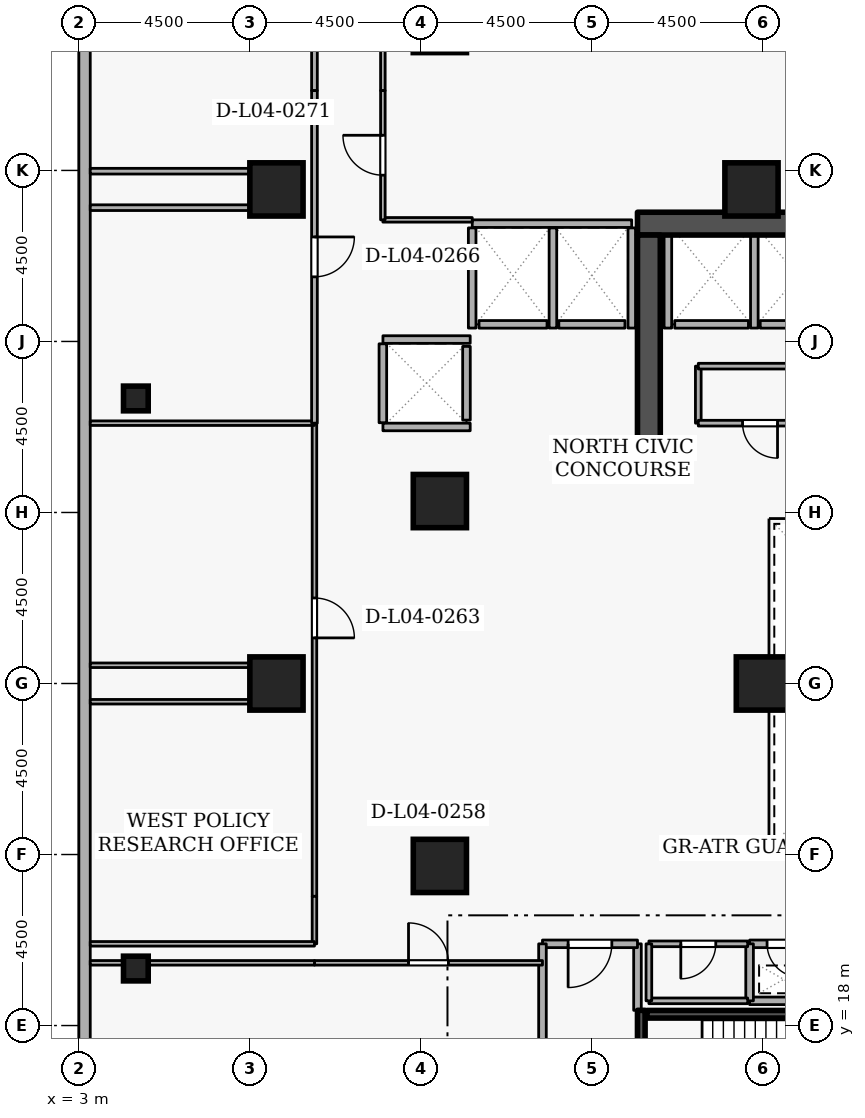
"""IFC4 building model, lengths in metres.
Left out: names, types, materials, properties, quantities, classifications, styles, units other than length and angle.
Written with IfcOpenShell. Run it as: python <this file> out.ifc"""

import sys

from ifc_helpers import new_model, si_unit, direction, frame, frame_2d, origin, origin_2d, place, context, subcontext, project, spatial, rectangle, extrude, element, fill, save


model = new_model("IFC4")
c1 = context("Model", 3, precision=1e-05, world=origin(), true_north=direction((0.0, 1.0)))
c2 = subcontext(c1, "Body", "Model", "MODEL_VIEW")
j1 = project(units=[si_unit("LENGTHUNIT", "METRE"), si_unit("PLANEANGLEUNIT", "RADIAN")], contexts=[c1])
p1 = place(None, origin())
s1 = spatial("IfcSite", under=j1, at=p1, CompositionType="ELEMENT")
p2 = place(p1, origin())
s2 = spatial("IfcBuilding", under=s1, at=p2, CompositionType="ELEMENT")
p3 = place(p2, frame((0.0, 0.0, 18.6)))
s3 = spatial("IfcBuildingStorey", under=s2, at=p3, CompositionType="ELEMENT", Elevation=18.6)
p4 = place(p3, frame((17.7, 39.1, 0.0), z_axis=(0.0, 0.0, 1.0), x_axis=(1.0, 0.0, 0.0)))
e1 = element("IfcWall", 1, at=p4, inside=s3, PredefinedType="SHEAR", context=c2, shape_type="SweptSolid", body=[
    extrude(rectangle(XDim=15.6, YDim=0.6, at=frame_2d((7.8, 0.0))), origin(), (0.0, 0.0, 1.0), 4.5),
])
p5 = place(p3, frame((18.0, 33.1, 0.0), z_axis=(0.0, 0.0, 1.0), x_axis=(0.0, 1.0, 0.0)))
e2 = element("IfcWall", 2, at=p5, inside=s3, PredefinedType="SHEAR", context=c2, shape_type="SweptSolid", body=[
    extrude(rectangle(XDim=5.7, YDim=0.6, at=frame_2d((2.85, 0.0))), origin(), (0.0, 0.0, 1.0), 4.5),
])
for number, where, z_axis, x_axis in (
    (3, (8.2, 27.0, 0.0), (0.0, 0.0, 1.0), (1.0, 0.0, 0.0)),
    (4, (8.2, 40.0, 0.0), (0.0, 0.0, 1.0), (1.0, 0.0, 0.0)),
    (5, (12.5, 22.2, 0.0), (0.0, 0.0, 1.0), (1.0, 0.0, 0.0)),
    (6, (12.5, 31.8, 0.0), (0.0, 0.0, 1.0), (1.0, 0.0, 0.0)),
    (7, (20.7, 40.0, 0.0), (0.0, 0.0, 1.0), (1.0, 0.0, 0.0)),
    (8, (21.0, 27.0, 0.0), (0.0, 0.0, 1.0), (1.0, 0.0, 0.0)),
):
    element("IfcColumn", number, at=place(p3, frame(where, z_axis=z_axis, x_axis=x_axis)), inside=s3, PredefinedType="COLUMN", context=c2, shape_type="SweptSolid", body=[
        extrude(rectangle(XDim=1.4, YDim=1.4, at=origin_2d()), origin(), (0.0, 0.0, 1.0), 4.5),
    ])
for number, where, z_axis, x_axis in (
    (9, (4.5, 19.5, 0.0), (0.0, 0.0, 1.0), (1.0, 0.0, 0.0)),
    (10, (4.5, 34.5, 0.0), (0.0, 0.0, 1.0), (1.0, 0.0, 0.0)),
):
    element("IfcColumn", number, at=place(p3, frame(where, z_axis=z_axis, x_axis=x_axis)), inside=s3, PredefinedType="COLUMN", context=c2, shape_type="SweptSolid", body=[
        extrude(rectangle(XDim=0.65, YDim=0.65, at=origin_2d()), origin(), (0.0, 0.0, 1.0), 4.5),
    ])
p6 = place(p3, frame((3.15, 49.18, 0.0), z_axis=(0.0, 0.0, 1.0), x_axis=(0.0, -1.0, 0.0)))
e11 = element("IfcWall", 11, at=p6, inside=s3, PredefinedType="STANDARD", context=c2, shape_type="SweptSolid", body=[
    extrude(rectangle(XDim=38.36, YDim=0.3, at=frame_2d((19.18, 0.0))), origin(), (0.0, 0.0, 1.0), 3.56),
])
p7 = place(p3, frame((22.92, 36.45, 0.0), z_axis=(0.0, 0.0, 1.0), x_axis=(-1.0, 0.0, 0.0)))
e12 = element("IfcWall", 12, at=p7, inside=s3, PredefinedType="STANDARD", context=c2, shape_type="SweptSolid", body=[
    extrude(rectangle(XDim=1.99, YDim=0.2, at=frame_2d((0.995, 0.0))), origin(), (0.0, 0.0, 1.0), 4.16),
])
p8 = place(p3, frame((20.62, 36.45, 0.0), z_axis=(0.0, 0.0, 1.0), x_axis=(-1.0, 0.0, 0.0)))
e13 = element("IfcWall", 13, at=p8, inside=s3, PredefinedType="STANDARD", context=c2, shape_type="SweptSolid", body=[
    extrude(rectangle(XDim=1.94, YDim=0.2, at=frame_2d((0.97, 0.0))), origin(), (0.0, 0.0, 1.0), 4.16),
])
p9 = place(p3, frame((17.37, 36.45, 0.0), z_axis=(0.0, 0.0, 1.0), x_axis=(-1.0, 0.0, 0.0)))
e14 = element("IfcWall", 14, at=p9, inside=s3, PredefinedType="STANDARD", context=c2, shape_type="SweptSolid", body=[
    extrude(rectangle(XDim=1.74, YDim=0.2, at=frame_2d((0.87, 0.0))), origin(), (0.0, 0.0, 1.0), 4.16),
])
p10 = place(p3, frame((15.32, 36.45, 0.0), z_axis=(0.0, 0.0, 1.0), x_axis=(-1.0, 0.0, 0.0)))
e15 = element("IfcWall", 15, at=p10, inside=s3, PredefinedType="STANDARD", context=c2, shape_type="SweptSolid", body=[
    extrude(rectangle(XDim=1.79, YDim=0.2, at=frame_2d((0.895, 0.0))), origin(), (0.0, 0.0, 1.0), 4.16),
])
p11 = place(p3, frame((13.2, 33.93, 0.0), z_axis=(0.0, 0.0, 1.0), x_axis=(0.0, 1.0, 0.0)))
e16 = element("IfcWall", 16, at=p11, inside=s3, PredefinedType="STANDARD", context=c2, shape_type="SweptSolid", body=[
    extrude(rectangle(XDim=1.94, YDim=0.2, at=frame_2d((0.97, 0.0))), origin(), (0.0, 0.0, 1.0), 4.16),
])
for number, where, z_axis, x_axis in (
    (17, (20.775, 36.352, 0.0), (0.0, 0.0, 1.0), (0.0, 1.0, 0.0)),
    (18, (18.5, 36.352, 0.0), (0.0, 0.0, 1.0), (0.0, 1.0, 0.0)),
):
    element("IfcWall", number, at=place(p3, frame(where, z_axis=z_axis, x_axis=x_axis)), inside=s3, PredefinedType="STANDARD", context=c2, shape_type="SweptSolid", body=[
        extrude(rectangle(XDim=2.436, YDim=0.2, at=frame_2d((1.218, 0.0))), origin(), (0.0, 0.0, 1.0), 4.16),
    ])
p12 = place(p3, frame((13.352, 39.1, 0.0), z_axis=(0.0, 0.0, 1.0), x_axis=(1.0, 0.0, 0.0)))
e19 = element("IfcWall", 19, at=p12, inside=s3, PredefinedType="STANDARD", context=c2, shape_type="SweptSolid", body=[
    extrude(rectangle(XDim=4.196, YDim=0.2, at=frame_2d((2.098, 0.0))), origin(), (0.0, 0.0, 1.0), 4.16),
])
p13 = place(p3, frame((17.55, 36.352, 0.0), z_axis=(0.0, 0.0, 1.0), x_axis=(0.0, 1.0, 0.0)))
e20 = element("IfcWall", 20, at=p13, inside=s3, PredefinedType="STANDARD", context=c2, shape_type="SweptSolid", body=[
    extrude(rectangle(XDim=2.636, YDim=0.2, at=frame_2d((1.318, 0.0))), origin(), (0.0, 0.0, 1.0), 3.365),
])
for number, where, z_axis, x_axis in (
    (21, (15.475, 36.352, 0.0), (0.0, 0.0, 1.0), (0.0, 1.0, 0.0)),
    (22, (13.35, 36.352, 0.0), (0.0, 0.0, 1.0), (0.0, 1.0, 0.0)),
):
    element("IfcWall", number, at=place(p3, frame(where, z_axis=z_axis, x_axis=x_axis)), inside=s3, PredefinedType="STANDARD", context=c2, shape_type="SweptSolid", body=[
        extrude(rectangle(XDim=2.636, YDim=0.2, at=frame_2d((1.318, 0.0))), origin(), (0.0, 0.0, 1.0), 4.16),
    ])
for number, where, z_axis, x_axis in (
    (23, (11.002, 36.05, 0.0), (0.0, 0.0, 1.0), (1.0, 0.0, 0.0)),
    (24, (11.002, 33.75, 0.0), (0.0, 0.0, 1.0), (1.0, 0.0, 0.0)),
):
    element("IfcWall", number, at=place(p3, frame(where, z_axis=z_axis, x_axis=x_axis)), inside=s3, PredefinedType="STANDARD", context=c2, shape_type="SweptSolid", body=[
        extrude(rectangle(XDim=2.296, YDim=0.2, at=frame_2d((1.148, 0.0))), origin(), (0.0, 0.0, 1.0), 4.16),
    ])
p14 = place(p3, frame((11.0, 33.862, 0.0), z_axis=(0.0, 0.0, 1.0), x_axis=(0.0, 1.0, 0.0)))
e25 = element("IfcWall", 25, at=p14, inside=s3, PredefinedType="STANDARD", context=c2, shape_type="SweptSolid", body=[
    extrude(rectangle(XDim=2.076, YDim=0.2, at=frame_2d((1.038, 0.0))), origin(), (0.0, 0.0, 1.0), 4.16),
])
p15 = place(p3, frame((17.8, 15.05, 0.0), z_axis=(0.0, 0.0, 1.0), x_axis=(0.0, 1.0, 0.0)))
e26 = element("IfcWall", 26, at=p15, inside=s3, PredefinedType="SHEAR", context=c2, shape_type="SweptSolid", body=[
    extrude(rectangle(XDim=3.35, YDim=0.2, at=frame_2d((1.675, 0.0))), origin(), (0.0, 0.0, 1.0), 4.5),
])
p16 = place(p15, frame((1.125, 0.0, 0.0)))
e27 = element("IfcOpeningElement", 27, at=p16, cuts=e26, PredefinedType="OPENING", context=c2, shape_type="SweptSolid", body=[
    extrude(rectangle(XDim=1.1, YDim=2.1, at=frame_2d((0.55, 1.05))), frame((0.0, 0.11, 0.0), z_axis=(0.0, -1.0, 0.0), x_axis=(1.0, 0.0, 0.0)), (0.0, 0.0, 1.0), 0.22),
])
p17 = place(p3, frame((25.05, 18.297, 0.0), z_axis=(0.0, 0.0, 1.0), x_axis=(-1.0, 0.0, 0.0)))
e28 = element("IfcWall", 28, at=p17, inside=s3, PredefinedType="SHEAR", context=c2, shape_type="SweptSolid", body=[
    extrude(rectangle(XDim=7.1, YDim=0.2, at=frame_2d((3.55, 0.0))), origin(), (0.0, 0.0, 1.0), 4.5),
])
p18 = place(p3, frame((17.7, 18.4, 0.0), z_axis=(0.0, 0.0, 1.0), x_axis=(0.0, 1.0, 0.0)))
e29 = element("IfcWall", 29, at=p18, inside=s3, PredefinedType="STANDARD", context=c2, shape_type="SweptSolid", body=[
    extrude(rectangle(XDim=1.75, YDim=0.2, at=frame_2d((0.875, 0.0))), origin(), (0.0, 0.0, 1.0), 3.365),
])
p19 = place(p3, frame((17.7, 20.15, 0.0), z_axis=(0.0, 0.0, 1.0), x_axis=(-1.0, 0.0, 0.0)))
e30 = element("IfcWall", 30, at=p19, inside=s3, PredefinedType="STANDARD", context=c2, shape_type="SweptSolid", body=[
    extrude(rectangle(XDim=2.5, YDim=0.2, at=frame_2d((1.25, 0.0))), origin(), (0.0, 0.0, 1.0), 4.16),
])
p20 = place(p19, frame((0.675, 0.0, 0.0)))
e31 = element("IfcOpeningElement", 31, at=p20, cuts=e30, PredefinedType="OPENING", context=c2, shape_type="SweptSolid", body=[
    extrude(rectangle(XDim=1.15, YDim=2.1, at=frame_2d((0.575, 1.05))), frame((0.0, 0.11, 0.0), z_axis=(0.0, -1.0, 0.0), x_axis=(1.0, 0.0, 0.0)), (0.0, 0.0, 1.0), 0.22),
])
p21 = place(p3, frame((15.2, 20.15, 0.0), z_axis=(0.0, 0.0, 1.0), x_axis=(0.0, -1.0, 0.0)))
e32 = element("IfcWall", 32, at=p21, inside=s3, PredefinedType="STANDARD", context=c2, shape_type="SweptSolid", body=[
    extrude(rectangle(XDim=5.15, YDim=0.2, at=frame_2d((2.575, 0.0))), origin(), (0.0, 0.0, 1.0), 4.16),
])
p22 = place(p3, frame((20.65, 18.65, 0.0), z_axis=(0.0, 0.0, 1.0), x_axis=(1.0, 0.0, 0.0)))
e33 = element("IfcWall", 33, at=p22, inside=s3, PredefinedType="STANDARD", context=c2, shape_type="SweptSolid", body=[
    extrude(rectangle(XDim=1.8, YDim=0.2, at=frame_2d((0.9, 0.0))), origin(), (0.0, 0.0, 1.0), 4.16),
])
p23 = place(p3, frame((22.45, 20.15, 0.0), z_axis=(0.0, 0.0, 1.0), x_axis=(-1.0, 0.0, 0.0)))
e34 = element("IfcWall", 34, at=p23, inside=s3, PredefinedType="STANDARD", context=c2, shape_type="SweptSolid", body=[
    extrude(rectangle(XDim=1.8, YDim=0.2, at=frame_2d((0.9, 0.0))), origin(), (0.0, 0.0, 1.0), 4.16),
])
p24 = place(p23, frame((0.46, 0.0, 0.0)))
e35 = element("IfcOpeningElement", 35, at=p24, cuts=e34, PredefinedType="OPENING", context=c2, shape_type="SweptSolid", body=[
    extrude(rectangle(XDim=0.88, YDim=2.04, at=frame_2d((0.44, 1.02))), frame((0.0, 0.11, 0.0), z_axis=(0.0, -1.0, 0.0), x_axis=(1.0, 0.0, 0.0)), (0.0, 0.0, 1.0), 0.22),
])
p25 = place(p3, frame((20.65, 20.15, 0.0), z_axis=(0.0, 0.0, 1.0), x_axis=(0.0, -1.0, 0.0)))
e36 = element("IfcWall", 36, at=p25, inside=s3, PredefinedType="STANDARD", context=c2, shape_type="SweptSolid", body=[
    extrude(rectangle(XDim=1.5, YDim=0.2, at=frame_2d((0.75, 0.0))), origin(), (0.0, 0.0, 1.0), 4.16),
])
p26 = place(p3, frame((18.0, 18.65, 0.0), z_axis=(0.0, 0.0, 1.0), x_axis=(1.0, 0.0, 0.0)))
e37 = element("IfcWall", 37, at=p26, inside=s3, PredefinedType="PARTITIONING", context=c2, shape_type="SweptSolid", body=[
    extrude(rectangle(XDim=2.6, YDim=0.15, at=frame_2d((1.3, 0.0))), origin(), (0.0, 0.0, 1.0), 4.16),
])
p27 = place(p3, frame((20.6, 20.15, 0.0), z_axis=(0.0, 0.0, 1.0), x_axis=(-1.0, 0.0, 0.0)))
e38 = element("IfcWall", 38, at=p27, inside=s3, PredefinedType="PARTITIONING", context=c2, shape_type="SweptSolid", body=[
    extrude(rectangle(XDim=2.6, YDim=0.15, at=frame_2d((1.3, 0.0))), origin(), (0.0, 0.0, 1.0), 4.16),
])
p28 = place(p27, frame((0.84, 0.0, 0.0)))
e39 = element("IfcOpeningElement", 39, at=p28, cuts=e38, PredefinedType="OPENING", context=c2, shape_type="SweptSolid", body=[
    extrude(rectangle(XDim=0.92, YDim=2.08, at=frame_2d((0.46, 1.04))), frame((0.0, 0.085, 0.0), z_axis=(0.0, -1.0, 0.0), x_axis=(1.0, 0.0, 0.0)), (0.0, 0.0, 1.0), 0.17),
])
p29 = place(p3, frame((18.0, 20.15, 0.0), z_axis=(0.0, 0.0, 1.0), x_axis=(0.0, -1.0, 0.0)))
e40 = element("IfcWall", 40, at=p29, inside=s3, PredefinedType="PARTITIONING", context=c2, shape_type="SweptSolid", body=[
    extrude(rectangle(XDim=1.5, YDim=0.15, at=frame_2d((0.75, 0.0))), origin(), (0.0, 0.0, 1.0), 3.365),
])
p30 = place(p3, frame((19.3, 33.85, 0.0), z_axis=(0.0, 0.0, 1.0), x_axis=(0.0, 1.0, 0.0)))
e41 = element("IfcWall", 41, at=p30, inside=s3, PredefinedType="PARTITIONING", context=c2, shape_type="SweptSolid", body=[
    extrude(rectangle(XDim=1.5, YDim=0.15, at=frame_2d((0.75, 0.0))), origin(), (0.0, 0.0, 1.0), 4.16),
])
p31 = place(p3, frame((19.3, 35.35, 0.0), z_axis=(0.0, 0.0, 1.0), x_axis=(1.0, 0.0, 0.0)))
e42 = element("IfcWall", 42, at=p31, inside=s3, PredefinedType="PARTITIONING", context=c2, shape_type="SweptSolid", body=[
    extrude(rectangle(XDim=3.25, YDim=0.15, at=frame_2d((1.625, 0.0))), origin(), (0.0, 0.0, 1.0), 4.16),
])
p32 = place(p3, frame((22.55, 33.85, 0.0), z_axis=(0.0, 0.0, 1.0), x_axis=(-1.0, 0.0, 0.0)))
e43 = element("IfcWall", 43, at=p32, inside=s3, PredefinedType="PARTITIONING", context=c2, shape_type="SweptSolid", body=[
    extrude(rectangle(XDim=3.25, YDim=0.15, at=frame_2d((1.625, 0.0))), origin(), (0.0, 0.0, 1.0), 4.16),
])
p33 = place(p32, frame((1.165, 0.0, 0.0)))
e44 = element("IfcOpeningElement", 44, at=p33, cuts=e43, PredefinedType="OPENING", context=c2, shape_type="SweptSolid", body=[
    extrude(rectangle(XDim=0.92, YDim=2.08, at=frame_2d((0.46, 1.04))), frame((0.0, 0.085, 0.0), z_axis=(0.0, -1.0, 0.0), x_axis=(1.0, 0.0, 0.0)), (0.0, 0.0, 1.0), 0.17),
])
p34 = place(p3, frame((9.2, 19.65, 0.0), z_axis=(0.0, 0.0, 1.0), x_axis=(1.0, 0.0, 0.0)))
e45 = element("IfcWall", 45, at=p34, inside=s3, PredefinedType="PARTITIONING", context=c2, shape_type="SweptSolid", body=[
    extrude(rectangle(XDim=6.0, YDim=0.12, at=frame_2d((3.0, 0.0))), origin(), (0.0, 0.0, 1.0), 4.16),
])
p35 = place(p34, frame((2.475, 0.0, 0.0)))
e46 = element("IfcOpeningElement", 46, at=p35, cuts=e45, PredefinedType="OPENING", context=c2, shape_type="SweptSolid", body=[
    extrude(rectangle(XDim=1.05, YDim=2.1, at=frame_2d((0.525, 1.05))), frame((0.0, 0.07, 0.0), z_axis=(0.0, -1.0, 0.0), x_axis=(1.0, 0.0, 0.0)), (0.0, 0.0, 1.0), 0.14),
])
p36 = place(p3, frame((3.3, 19.65, 0.0), z_axis=(0.0, 0.0, 1.0), x_axis=(1.0, 0.0, 0.0)))
e47 = element("IfcWall", 47, at=p36, inside=s3, PredefinedType="PARTITIONING", context=c2, shape_type="SweptSolid", body=[
    extrude(rectangle(XDim=5.9, YDim=0.12, at=frame_2d((2.95, 0.0))), origin(), (0.0, 0.0, 1.0), 4.16),
])
p37 = place(p3, frame((9.2, 33.85, 0.0), z_axis=(0.0, 0.0, 1.0), x_axis=(0.0, -1.0, 0.0)))
e48 = element("IfcWall", 48, at=p37, inside=s3, PredefinedType="PARTITIONING", context=c2, shape_type="SweptSolid", body=[
    extrude(rectangle(XDim=12.45, YDim=0.12, at=frame_2d((6.225, 0.0))), origin(), (0.0, 0.0, 1.0), 4.16),
])
p38 = place(p37, frame((4.6, 0.0, 0.0)))
e49 = element("IfcOpeningElement", 49, at=p38, cuts=e48, PredefinedType="OPENING", context=c2, shape_type="SweptSolid", body=[
    extrude(rectangle(XDim=1.05, YDim=2.1, at=frame_2d((0.525, 1.05))), frame((0.0, 0.07, 0.0), z_axis=(0.0, -1.0, 0.0), x_axis=(1.0, 0.0, 0.0)), (0.0, 0.0, 1.0), 0.14),
])
p39 = place(p3, frame((9.2, 21.4, 0.0), z_axis=(0.0, 0.0, 1.0), x_axis=(0.0, -1.0, 0.0)))
e50 = element("IfcWall", 50, at=p39, inside=s3, PredefinedType="PARTITIONING", context=c2, shape_type="SweptSolid", body=[
    extrude(rectangle(XDim=1.25, YDim=0.12, at=frame_2d((0.625, 0.0))), origin(), (0.0, 0.0, 1.0), 4.16),
])
p40 = place(p3, frame((9.2, 20.15, 0.0), z_axis=(0.0, 0.0, 1.0), x_axis=(-1.0, 0.0, 0.0)))
e51 = element("IfcWall", 51, at=p40, inside=s3, PredefinedType="PARTITIONING", context=c2, shape_type="SweptSolid", body=[
    extrude(rectangle(XDim=5.9, YDim=0.12, at=frame_2d((2.95, 0.0))), origin(), (0.0, 0.0, 1.0), 4.16),
])
for number, where, z_axis, x_axis in (
    (52, (3.3, 26.52, 0.0), (0.0, 0.0, 1.0), (1.0, 0.0, 0.0)),
    (53, (8.2, 27.48, 0.0), (0.0, 0.0, 1.0), (-1.0, 0.0, 0.0)),
):
    element("IfcWall", number, at=place(p3, frame(where, z_axis=z_axis, x_axis=x_axis)), inside=s3, PredefinedType="PARTITIONING", context=c2, shape_type="SweptSolid", body=[
        extrude(rectangle(XDim=4.9, YDim=0.12, at=frame_2d((2.45, 0.0))), origin(), (0.0, 0.0, 1.0), 4.16),
    ])
p41 = place(p3, frame((3.3, 33.85, 0.0), z_axis=(0.0, 0.0, 1.0), x_axis=(1.0, 0.0, 0.0)))
e54 = element("IfcWall", 54, at=p41, inside=s3, PredefinedType="PARTITIONING", context=c2, shape_type="SweptSolid", body=[
    extrude(rectangle(XDim=5.9, YDim=0.12, at=frame_2d((2.95, 0.0))), origin(), (0.0, 0.0, 1.0), 4.16),
])
p42 = place(p3, frame((9.2, 49.18, 0.0), z_axis=(0.0, 0.0, 1.0), x_axis=(0.0, -1.0, 0.0)))
e55 = element("IfcWall", 55, at=p42, inside=s3, PredefinedType="PARTITIONING", context=c2, shape_type="SweptSolid", body=[
    extrude(rectangle(XDim=6.58, YDim=0.15, at=frame_2d((3.29, 0.0))), origin(), (0.0, 0.0, 1.0), 4.16),
])
p43 = place(p3, frame((9.2, 42.6, 0.0), z_axis=(0.0, 0.0, 1.0), x_axis=(0.0, -1.0, 0.0)))
e56 = element("IfcWall", 56, at=p43, inside=s3, PredefinedType="PARTITIONING", context=c2, shape_type="SweptSolid", body=[
    extrude(rectangle(XDim=8.75, YDim=0.15, at=frame_2d((4.375, 0.0))), origin(), (0.0, 0.0, 1.0), 4.16),
])
p44 = place(p43, frame((3.85, 0.0, 0.0)))
e57 = element("IfcOpeningElement", 57, at=p44, cuts=e56, PredefinedType="OPENING", context=c2, shape_type="SweptSolid", body=[
    extrude(rectangle(XDim=1.05, YDim=2.1, at=frame_2d((0.525, 1.05))), frame((0.0, 0.085, 0.0), z_axis=(0.0, -1.0, 0.0), x_axis=(1.0, 0.0, 0.0)), (0.0, 0.0, 1.0), 0.17),
])
for number, where, z_axis, x_axis in (
    (58, (3.3, 39.52, 0.0), (0.0, 0.0, 1.0), (1.0, 0.0, 0.0)),
    (59, (8.2, 40.48, 0.0), (0.0, 0.0, 1.0), (-1.0, 0.0, 0.0)),
):
    element("IfcWall", number, at=place(p3, frame(where, z_axis=z_axis, x_axis=x_axis)), inside=s3, PredefinedType="PARTITIONING", context=c2, shape_type="SweptSolid", body=[
        extrude(rectangle(XDim=4.9, YDim=0.15, at=frame_2d((2.45, 0.0))), origin(), (0.0, 0.0, 1.0), 4.16),
    ])
p45 = place(p3, frame((11.0, 42.6, 0.0), z_axis=(0.0, 0.0, 1.0), x_axis=(0.0, 1.0, 0.0)))
e60 = element("IfcWall", 60, at=p45, inside=s3, PredefinedType="PARTITIONING", context=c2, shape_type="SweptSolid", body=[
    extrude(rectangle(XDim=6.58, YDim=0.12, at=frame_2d((3.29, 0.0))), origin(), (0.0, 0.0, 1.0), 4.16),
])
p46 = place(p3, frame((13.352, 39.2, 0.0), z_axis=(0.0, 0.0, 1.0), x_axis=(-1.0, 0.0, 0.0)))
e61 = element("IfcWall", 61, at=p46, inside=s3, PredefinedType="PARTITIONING", context=c2, shape_type="SweptSolid", body=[
    extrude(rectangle(XDim=2.352, YDim=0.12, at=frame_2d((1.176, 0.0))), origin(), (0.0, 0.0, 1.0), 4.16),
])
p47 = place(p3, frame((11.0, 39.2, 0.0), z_axis=(0.0, 0.0, 1.0), x_axis=(0.0, 1.0, 0.0)))
e62 = element("IfcWall", 62, at=p47, inside=s3, PredefinedType="PARTITIONING", context=c2, shape_type="SweptSolid", body=[
    extrude(rectangle(XDim=3.4, YDim=0.12, at=frame_2d((1.7, 0.0))), origin(), (0.0, 0.0, 1.0), 4.16),
])
p48 = place(p47, frame((1.175, 0.0, 0.0)))
e63 = element("IfcOpeningElement", 63, at=p48, cuts=e62, PredefinedType="OPENING", context=c2, shape_type="SweptSolid", body=[
    extrude(rectangle(XDim=1.05, YDim=2.1, at=frame_2d((0.525, 1.05))), frame((0.0, 0.07, 0.0), z_axis=(0.0, -1.0, 0.0), x_axis=(1.0, 0.0, 0.0)), (0.0, 0.0, 1.0), 0.14),
])
p49 = place(p20, origin())
e64 = element("IfcDoor", 64, at=p49, inside=s3, OperationType="SINGLE_SWING_RIGHT", PredefinedType="DOOR", context=c2, shape_type="SweptSolid", body=[
    extrude(rectangle(XDim=1.15, YDim=2.1, at=frame_2d((0.575, 1.05))), frame((0.0, 0.025, 0.0), z_axis=(0.0, -1.0, 0.0), x_axis=(1.0, 0.0, 0.0)), (0.0, 0.0, 1.0), 0.05),
])
fill(e31, e64)
p50 = place(p24, origin())
e65 = element("IfcDoor", 65, at=p50, inside=s3, OperationType="SINGLE_SWING_LEFT", PredefinedType="DOOR", context=c2, shape_type="SweptSolid", body=[
    extrude(rectangle(XDim=0.88, YDim=2.04, at=frame_2d((0.44, 1.02))), frame((0.0, 0.025, 0.0), z_axis=(0.0, -1.0, 0.0), x_axis=(1.0, 0.0, 0.0)), (0.0, 0.0, 1.0), 0.05),
])
fill(e35, e65)
p51 = place(p28, origin())
e66 = element("IfcDoor", 66, at=p51, inside=s3, OperationType="SINGLE_SWING_RIGHT", PredefinedType="DOOR", context=c2, shape_type="SweptSolid", body=[
    extrude(rectangle(XDim=0.92, YDim=2.08, at=frame_2d((0.46, 1.04))), frame((0.0, 0.025, 0.0), z_axis=(0.0, -1.0, 0.0), x_axis=(1.0, 0.0, 0.0)), (0.0, 0.0, 1.0), 0.05),
])
fill(e39, e66)
p52 = place(p33, origin())
e67 = element("IfcDoor", 67, at=p52, inside=s3, OperationType="SINGLE_SWING_LEFT", PredefinedType="DOOR", context=c2, shape_type="SweptSolid", body=[
    extrude(rectangle(XDim=0.92, YDim=2.08, at=frame_2d((0.46, 1.04))), frame((0.0, 0.025, 0.0), z_axis=(0.0, -1.0, 0.0), x_axis=(1.0, 0.0, 0.0)), (0.0, 0.0, 1.0), 0.05),
])
fill(e44, e67)
p53 = place(p35, origin())
e68 = element("IfcDoor", 68, at=p53, inside=s3, OperationType="SINGLE_SWING_LEFT", PredefinedType="DOOR", context=c2, shape_type="SweptSolid", body=[
    extrude(rectangle(XDim=1.05, YDim=2.1, at=frame_2d((0.525, 1.05))), frame((0.0, 0.025, 0.0), z_axis=(0.0, -1.0, 0.0), x_axis=(1.0, 0.0, 0.0)), (0.0, 0.0, 1.0), 0.05),
])
fill(e46, e68)
p54 = place(p38, origin())
e69 = element("IfcDoor", 69, at=p54, inside=s3, OperationType="SINGLE_SWING_RIGHT", PredefinedType="DOOR", context=c2, shape_type="SweptSolid", body=[
    extrude(rectangle(XDim=1.05, YDim=2.1, at=frame_2d((0.525, 1.05))), frame((0.0, 0.025, 0.0), z_axis=(0.0, -1.0, 0.0), x_axis=(1.0, 0.0, 0.0)), (0.0, 0.0, 1.0), 0.05),
])
fill(e49, e69)
p55 = place(p44, origin())
e70 = element("IfcDoor", 70, at=p55, inside=s3, OperationType="SINGLE_SWING_LEFT", PredefinedType="DOOR", context=c2, shape_type="SweptSolid", body=[
    extrude(rectangle(XDim=1.05, YDim=2.1, at=frame_2d((0.525, 1.05))), frame((0.0, 0.025, 0.0), z_axis=(0.0, -1.0, 0.0), x_axis=(1.0, 0.0, 0.0)), (0.0, 0.0, 1.0), 0.05),
])
fill(e57, e70)
p56 = place(p48, origin())
e71 = element("IfcDoor", 71, at=p56, inside=s3, OperationType="SINGLE_SWING_RIGHT", PredefinedType="DOOR", context=c2, shape_type="SweptSolid", body=[
    extrude(rectangle(XDim=1.05, YDim=2.1, at=frame_2d((0.525, 1.05))), frame((0.0, 0.025, 0.0), z_axis=(0.0, -1.0, 0.0), x_axis=(1.0, 0.0, 0.0)), (0.0, 0.0, 1.0), 0.05),
])
fill(e63, e71)
save(model, sys.argv[1])
